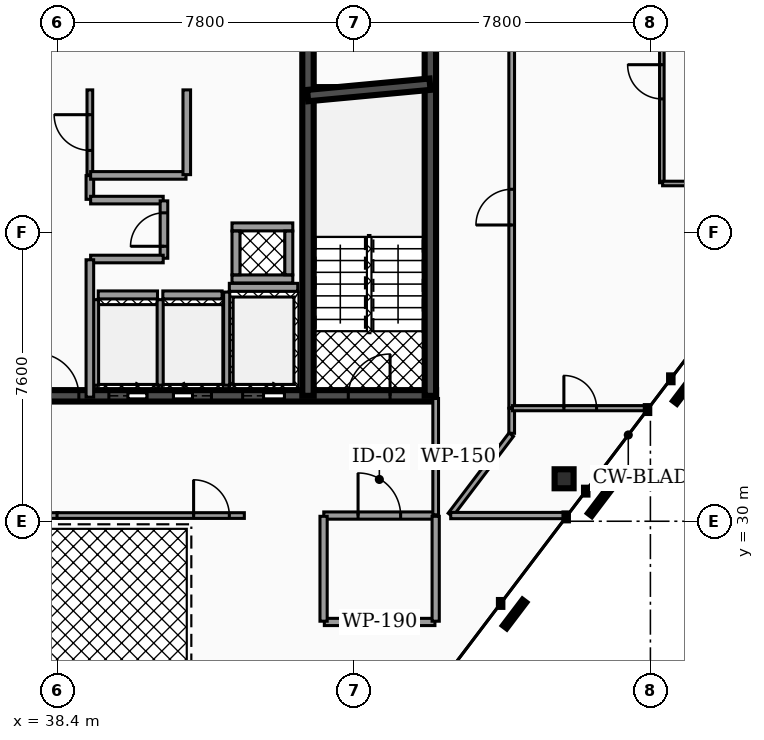
"""IFC4 building model, lengths in metres.
Left out: names, types, materials, properties, quantities, classifications, styles, units other than length and angle.
Written with IfcOpenShell. Run it as: python <this file> out.ifc"""

import sys

from ifc_helpers import new_model, si_unit, direction, frame, frame_2d, origin, origin_2d, place, context, subcontext, project, spatial, rectangle, hollow_rectangle, extrude, element, fill, save


model = new_model("IFC4")
c1 = context("Model", 3, precision=1e-05, world=origin(), true_north=direction((0.0, 1.0)))
c2 = subcontext(c1, "Body", "Model", "MODEL_VIEW")
j1 = project(units=[si_unit("LENGTHUNIT", "METRE"), si_unit("PLANEANGLEUNIT", "RADIAN")], contexts=[c1])
p1 = place(None, origin())
s1 = spatial("IfcSite", under=j1, at=p1, CompositionType="ELEMENT")
p2 = place(p1, origin())
s2 = spatial("IfcBuilding", under=s1, at=p2, CompositionType="ELEMENT")
p3 = place(p2, frame((0.0, 0.0, 265.2)))
s3 = spatial("IfcBuildingStorey", under=s2, at=p3, CompositionType="ELEMENT", Elevation=265.2)
p4 = place(p3, frame((28.5, 33.3, 0.0), z_axis=(0.0, 0.0, 1.0), x_axis=(1.0, 0.0, 0.0)))
e1 = element("IfcWall", 1, at=p4, inside=s3, PredefinedType="SHEAR", context=c2, shape_type="SweptSolid", body=[
    extrude(rectangle(XDim=19.86, YDim=0.3, at=frame_2d((9.93, 0.0))), origin(), (0.0, 0.0, 1.0), 3.18),
])
p5 = place(p4, frame((3.93, 0.0, 0.0)))
e2 = element("IfcOpeningElement", 2, at=p5, cuts=e1, PredefinedType="OPENING", context=c2, shape_type="SweptSolid", body=[
    extrude(rectangle(XDim=1.1, YDim=2.15, at=frame_2d((0.55, 1.075))), frame((0.0, 0.16, 0.0), z_axis=(0.0, -1.0, 0.0), x_axis=(1.0, 0.0, 0.0)), (0.0, 0.0, 1.0), 0.32),
])
p6 = place(p4, frame((14.77, 0.0, 0.0)))
e3 = element("IfcOpeningElement", 3, at=p6, cuts=e1, PredefinedType="OPENING", context=c2, shape_type="SweptSolid", body=[
    extrude(rectangle(XDim=1.1, YDim=2.15, at=frame_2d((0.55, 1.075))), frame((0.0, 0.16, 0.0), z_axis=(0.0, -1.0, 0.0), x_axis=(1.0, 0.0, 0.0)), (0.0, 0.0, 1.0), 0.32),
])
p7 = place(p4, frame((11.25, 0.0, 0.0)))
e4 = element("IfcOpeningElement", 4, at=p7, cuts=e1, PredefinedType="OPENING", context=c2, shape_type="SweptSolid", body=[
    extrude(rectangle(XDim=1.0, YDim=2.1, at=frame_2d((0.5, 1.05))), frame((0.0, 0.16, 0.0), z_axis=(0.0, -1.0, 0.0), x_axis=(1.0, 0.0, 0.0)), (0.0, 0.0, 1.0), 0.32),
])
p8 = place(p4, frame((12.95, 0.0, 0.0)))
e5 = element("IfcOpeningElement", 5, at=p8, cuts=e1, PredefinedType="OPENING", context=c2, shape_type="SweptSolid", body=[
    extrude(rectangle(XDim=1.0, YDim=2.1, at=frame_2d((0.5, 1.05))), frame((0.0, 0.16, 0.0), z_axis=(0.0, -1.0, 0.0), x_axis=(1.0, 0.0, 0.0)), (0.0, 0.0, 1.0), 0.32),
])
p9 = place(p4, frame((5.85, 0.0, 0.0)))
e6 = element("IfcOpeningElement", 6, at=p9, cuts=e1, PredefinedType="OPENING", context=c2, shape_type="SweptSolid", body=[
    extrude(rectangle(XDim=1.0, YDim=2.1, at=frame_2d((0.5, 1.05))), frame((0.0, 0.16, 0.0), z_axis=(0.0, -1.0, 0.0), x_axis=(1.0, 0.0, 0.0)), (0.0, 0.0, 1.0), 0.32),
])
p10 = place(p4, frame((1.21, 0.0, 0.0)))
e7 = element("IfcOpeningElement", 7, at=p10, cuts=e1, PredefinedType="OPENING", context=c2, shape_type="SweptSolid", body=[
    extrude(rectangle(XDim=1.1, YDim=2.2, at=frame_2d((0.55, 1.1))), frame((0.0, 0.16, 0.0), z_axis=(0.0, -1.0, 0.0), x_axis=(1.0, 0.0, 0.0)), (0.0, 0.0, 1.0), 0.32),
])
p11 = place(p4, frame((9.34, 0.0, 0.0)))
e8 = element("IfcOpeningElement", 8, at=p11, cuts=e1, PredefinedType="OPENING", context=c2, shape_type="SweptSolid", body=[
    extrude(rectangle(XDim=1.12, YDim=2.05, at=frame_2d((0.56, 1.025))), frame((0.0, 0.16, 0.0), z_axis=(0.0, -1.0, 0.0), x_axis=(1.0, 0.0, 0.0)), (0.0, 0.0, 1.0), 0.32),
])
p12 = place(p4, frame((17.55, 0.0, 0.0)))
e9 = element("IfcOpeningElement", 9, at=p12, cuts=e1, PredefinedType="OPENING", context=c2, shape_type="SweptSolid", body=[
    extrude(rectangle(XDim=1.1, YDim=2.2, at=frame_2d((0.55, 1.1))), frame((0.0, 0.16, 0.0), z_axis=(0.0, -1.0, 0.0), x_axis=(1.0, 0.0, 0.0)), (0.0, 0.0, 1.0), 0.32),
])
for number, where, z_axis, x_axis in (
    (10, (44.99, 33.3, 0.0), (0.0, 0.0, 1.0), (0.0, 1.0, 0.0)),
    (11, (48.21, 33.3, 0.0), (0.0, 0.0, 1.0), (0.0, 1.0, 0.0)),
):
    element("IfcWall", number, at=place(p3, frame(where, z_axis=z_axis, x_axis=x_axis)), inside=s3, PredefinedType="SHEAR", context=c2, shape_type="SweptSolid", body=[
        extrude(rectangle(XDim=10.1, YDim=0.3, at=frame_2d((5.05, 0.0))), origin(), (0.0, 0.0, 1.0), 3.18),
    ])
p13 = place(p3, frame((44.98, 41.2, 0.0), z_axis=(0.0, 0.0, 1.0), x_axis=(0.995686468965, 0.09278176286, 0.0)))
e12 = element("IfcWall", 12, at=p13, inside=s3, PredefinedType="SHEAR", context=c2, shape_type="SweptSolid", body=[
    extrude(rectangle(XDim=3.234, YDim=0.3, at=frame_2d((1.617, 0.0))), origin(), (0.0, 0.0, 1.0), 3.18),
])
p14 = place(p3, frame((51.729, 31.117, 0.0), z_axis=(-0.140882555326, 0.118923892445, 0.982857677088), x_axis=(-0.645042764465, -0.764146472878, 0.0)))
e13 = element("IfcColumn", 13, at=p14, inside=s3, PredefinedType="COLUMN", context=c2, shape_type="SweptSolid", body=[
    extrude(hollow_rectangle(XDim=0.5, YDim=0.5, WallThickness=0.025, at=origin_2d()), origin(), (0.0, 0.0, 1.0), 3.235),
])
p15 = place(p3, frame((42.92, 36.155, 0.0), z_axis=(0.0, 0.0, 1.0), x_axis=(1.0, 0.0, 0.0)))
e14 = element("IfcWall", 14, at=p15, inside=s3, PredefinedType="SOLIDWALL", context=c2, shape_type="SweptSolid", body=[
    extrude(rectangle(XDim=1.8, YDim=0.21, at=frame_2d((0.9, 0.0))), origin(), (0.0, 0.0, 1.0), 3.18),
])
p16 = place(p3, frame((42.85, 33.58, 0.0), z_axis=(0.0, 0.0, 1.0), x_axis=(0.0, 1.0, 0.0)))
e15 = element("IfcWall", 15, at=p16, inside=s3, PredefinedType="SOLIDWALL", context=c2, shape_type="SweptSolid", body=[
    extrude(rectangle(XDim=2.45, YDim=0.16, at=frame_2d((1.225, 0.0))), origin(), (0.0, 0.0, 1.0), 3.18),
])
p17 = place(p3, frame((39.47, 35.955, 0.0), z_axis=(0.0, 0.0, 1.0), x_axis=(1.0, 0.0, 0.0)))
e16 = element("IfcWall", 16, at=p17, inside=s3, PredefinedType="SOLIDWALL", context=c2, shape_type="SweptSolid", body=[
    extrude(rectangle(XDim=1.56, YDim=0.21, at=frame_2d((0.78, 0.0))), origin(), (0.0, 0.0, 1.0), 3.18),
])
for number, where, z_axis, x_axis in (
    (17, (39.4, 33.58, 0.0), (0.0, 0.0, 1.0), (0.0, 1.0, 0.0)),
    (18, (41.1, 33.58, 0.0), (0.0, 0.0, 1.0), (0.0, 1.0, 0.0)),
):
    element("IfcWall", number, at=place(p3, frame(where, z_axis=z_axis, x_axis=x_axis)), inside=s3, PredefinedType="SOLIDWALL", context=c2, shape_type="SweptSolid", body=[
        extrude(rectangle(XDim=2.25, YDim=0.16, at=frame_2d((1.125, 0.0))), origin(), (0.0, 0.0, 1.0), 3.18),
    ])
p18 = place(p3, frame((41.17, 35.955, 0.0), z_axis=(0.0, 0.0, 1.0), x_axis=(1.0, 0.0, 0.0)))
e19 = element("IfcWall", 19, at=p18, inside=s3, PredefinedType="SOLIDWALL", context=c2, shape_type="SweptSolid", body=[
    extrude(rectangle(XDim=1.56, YDim=0.21, at=frame_2d((0.78, 0.0))), origin(), (0.0, 0.0, 1.0), 3.18),
])
for number, where, z_axis, x_axis in (
    (20, (42.99, 36.375, 0.0), (0.0, 0.0, 1.0), (1.0, 0.0, 0.0)),
    (21, (42.99, 37.745, 0.0), (0.0, 0.0, 1.0), (1.0, 0.0, 0.0)),
):
    element("IfcWall", number, at=place(p3, frame(where, z_axis=z_axis, x_axis=x_axis)), inside=s3, PredefinedType="SOLIDWALL", context=c2, shape_type="SweptSolid", body=[
        extrude(rectangle(XDim=1.6, YDim=0.21, at=frame_2d((0.8, 0.0))), origin(), (0.0, 0.0, 1.0), 3.18),
    ])
for number, where, z_axis, x_axis in (
    (22, (43.095, 36.485, 0.0), (0.0, 0.0, 1.0), (0.0, 1.0, 0.0)),
    (23, (44.485, 36.485, 0.0), (0.0, 0.0, 1.0), (0.0, 1.0, 0.0)),
):
    element("IfcWall", number, at=place(p3, frame(where, z_axis=z_axis, x_axis=x_axis)), inside=s3, PredefinedType="SOLIDWALL", context=c2, shape_type="SweptSolid", body=[
        extrude(rectangle(XDim=1.15, YDim=0.21, at=frame_2d((0.575, 0.0))), origin(), (0.0, 0.0, 1.0), 3.18),
    ])
p19 = place(p3, frame((39.25, 38.47, 0.0), z_axis=(0.0, 0.0, 1.0), x_axis=(0.0, 1.0, 0.0)))
e24 = element("IfcWall", 24, at=p19, inside=s3, PredefinedType="PARTITIONING", context=c2, shape_type="SweptSolid", body=[
    extrude(rectangle(XDim=0.625, YDim=0.2, at=frame_2d((0.312, 0.0))), origin(), (0.0, 0.0, 1.0), 2.235),
])
p20 = place(p3, frame((39.27, 38.45, 0.0), z_axis=(0.0, 0.0, 1.0), x_axis=(1.0, 0.0, 0.0)))
e25 = element("IfcWall", 25, at=p20, inside=s3, PredefinedType="PARTITIONING", context=c2, shape_type="SweptSolid", body=[
    extrude(rectangle(XDim=1.91, YDim=0.2, at=frame_2d((0.955, 0.0))), origin(), (0.0, 0.0, 1.0), 2.235),
])
p21 = place(p3, frame((41.2, 36.92, 0.0), z_axis=(0.0, 0.0, 1.0), x_axis=(0.0, 1.0, 0.0)))
e26 = element("IfcWall", 26, at=p21, inside=s3, PredefinedType="PARTITIONING", context=c2, shape_type="SweptSolid", body=[
    extrude(rectangle(XDim=1.51, YDim=0.2, at=frame_2d((0.755, 0.0))), origin(), (0.0, 0.0, 1.0), 2.235),
])
p22 = place(p21, frame((0.315, 0.0, 0.0)))
e27 = element("IfcOpeningElement", 27, at=p22, cuts=e26, PredefinedType="OPENING", context=c2, shape_type="SweptSolid", body=[
    extrude(rectangle(XDim=0.88, YDim=2.05, at=frame_2d((0.44, 1.025))), frame((0.0, 0.11, 0.0), z_axis=(0.0, -1.0, 0.0), x_axis=(1.0, 0.0, 0.0)), (0.0, 0.0, 1.0), 0.22),
])
p23 = place(p3, frame((39.27, 36.9, 0.0), z_axis=(0.0, 0.0, 1.0), x_axis=(1.0, 0.0, 0.0)))
e28 = element("IfcWall", 28, at=p23, inside=s3, PredefinedType="PARTITIONING", context=c2, shape_type="SweptSolid", body=[
    extrude(rectangle(XDim=1.91, YDim=0.2, at=frame_2d((0.955, 0.0))), origin(), (0.0, 0.0, 1.0), 2.235),
])
p24 = place(p3, frame((39.25, 33.265, 0.0), z_axis=(0.0, 0.0, 1.0), x_axis=(0.0, 1.0, 0.0)))
e29 = element("IfcWall", 29, at=p24, inside=s3, PredefinedType="PARTITIONING", context=c2, shape_type="SweptSolid", body=[
    extrude(rectangle(XDim=3.615, YDim=0.2, at=frame_2d((1.808, 0.0))), origin(), (0.0, 0.0, 1.0), 2.235),
])
p25 = place(p3, frame((39.25, 39.105, 0.0), z_axis=(0.0, 0.0, 1.0), x_axis=(0.0, 1.0, 0.0)))
e30 = element("IfcWall", 30, at=p25, inside=s3, PredefinedType="PARTITIONING", context=c2, shape_type="SweptSolid", body=[
    extrude(rectangle(XDim=2.245, YDim=0.15, at=frame_2d((1.123, 0.0))), origin(), (0.0, 0.0, 1.0), 2.235),
])
p26 = place(p25, frame((0.653, 0.0, 0.0)))
e31 = element("IfcOpeningElement", 31, at=p26, cuts=e30, PredefinedType="OPENING", context=c2, shape_type="SweptSolid", body=[
    extrude(rectangle(XDim=0.94, YDim=2.05, at=frame_2d((0.47, 1.025))), frame((0.0, 0.085, 0.0), z_axis=(0.0, -1.0, 0.0), x_axis=(1.0, 0.0, 0.0)), (0.0, 0.0, 1.0), 0.17),
])
p27 = place(p3, frame((39.27, 39.1, 0.0), z_axis=(0.0, 0.0, 1.0), x_axis=(1.0, 0.0, 0.0)))
e32 = element("IfcWall", 32, at=p27, inside=s3, PredefinedType="PARTITIONING", context=c2, shape_type="SweptSolid", body=[
    extrude(rectangle(XDim=2.51, YDim=0.2, at=frame_2d((1.255, 0.0))), origin(), (0.0, 0.0, 1.0), 2.235),
])
p28 = place(p3, frame((41.8, 39.12, 0.0), z_axis=(0.0, 0.0, 1.0), x_axis=(0.0, 1.0, 0.0)))
e33 = element("IfcWall", 33, at=p28, inside=s3, PredefinedType="PARTITIONING", context=c2, shape_type="SweptSolid", body=[
    extrude(rectangle(XDim=2.23, YDim=0.2, at=frame_2d((1.115, 0.0))), origin(), (0.0, 0.0, 1.0), 2.235),
])
p29 = place(p3, frame((45.405, 30.15, 0.0), z_axis=(0.0, 0.0, 1.0), x_axis=(1.0, 0.0, 0.0)))
e34 = element("IfcWall", 34, at=p29, inside=s3, PredefinedType="PARTITIONING", context=c2, shape_type="SweptSolid", body=[
    extrude(rectangle(XDim=2.925, YDim=0.19, at=frame_2d((1.462, 0.0))), origin(), (0.0, 0.0, 1.0), 2.235),
])
p30 = place(p29, frame((0.903, 0.0, 0.0)))
e35 = element("IfcOpeningElement", 35, at=p30, cuts=e34, PredefinedType="OPENING", context=c2, shape_type="SweptSolid", body=[
    extrude(rectangle(XDim=1.12, YDim=2.05, at=frame_2d((0.56, 1.025))), frame((0.0, 0.105, 0.0), z_axis=(0.0, -1.0, 0.0), x_axis=(1.0, 0.0, 0.0)), (0.0, 0.0, 1.0), 0.21),
])
p31 = place(p3, frame((48.35, 30.17, 0.0), z_axis=(0.0, 0.0, 1.0), x_axis=(0.0, 1.0, 0.0)))
e36 = element("IfcWall", 36, at=p31, inside=s3, PredefinedType="PARTITIONING", context=c2, shape_type="SweptSolid", body=[
    extrude(rectangle(XDim=3.06, YDim=0.15, at=frame_2d((1.53, 0.0))), origin(), (0.0, 0.0, 1.0), 2.235),
])
p32 = place(p3, frame((33.485, 30.15, 0.0), z_axis=(0.0, 0.0, 1.0), x_axis=(1.0, 0.0, 0.0)))
e37 = element("IfcWall", 37, at=p32, inside=s3, PredefinedType="PARTITIONING", context=c2, shape_type="SweptSolid", body=[
    extrude(rectangle(XDim=4.93, YDim=0.15, at=frame_2d((2.465, 0.0))), origin(), (0.0, 0.0, 1.0), 2.235),
])
p33 = place(p32, frame((0.395, 0.0, 0.0)))
e38 = element("IfcOpeningElement", 38, at=p33, cuts=e37, PredefinedType="OPENING", context=c2, shape_type="SweptSolid", body=[
    extrude(rectangle(XDim=0.94, YDim=2.05, at=frame_2d((0.47, 1.025))), frame((0.0, 0.085, 0.0), z_axis=(0.0, -1.0, 0.0), x_axis=(1.0, 0.0, 0.0)), (0.0, 0.0, 1.0), 0.17),
])
p34 = place(p3, frame((38.385, 30.15, 0.0), z_axis=(0.0, 0.0, 1.0), x_axis=(1.0, 0.0, 0.0)))
e39 = element("IfcWall", 39, at=p34, inside=s3, PredefinedType="PARTITIONING", context=c2, shape_type="SweptSolid", body=[
    extrude(rectangle(XDim=4.93, YDim=0.15, at=frame_2d((2.465, 0.0))), origin(), (0.0, 0.0, 1.0), 2.235),
])
p35 = place(p34, frame((3.595, 0.0, 0.0)))
e40 = element("IfcOpeningElement", 40, at=p35, cuts=e39, PredefinedType="OPENING", context=c2, shape_type="SweptSolid", body=[
    extrude(rectangle(XDim=0.94, YDim=2.05, at=frame_2d((0.47, 1.025))), frame((0.0, 0.085, 0.0), z_axis=(0.0, -1.0, 0.0), x_axis=(1.0, 0.0, 0.0)), (0.0, 0.0, 1.0), 0.17),
])
p36 = place(p3, frame((45.42, 27.35, 0.0), z_axis=(0.0, 0.0, 1.0), x_axis=(1.0, 0.0, 0.0)))
e41 = element("IfcWall", 41, at=p36, inside=s3, PredefinedType="PARTITIONING", context=c2, shape_type="SweptSolid", body=[
    extrude(rectangle(XDim=2.91, YDim=0.19, at=frame_2d((1.455, 0.0))), origin(), (0.0, 0.0, 1.0), 2.235),
])
for number, where, z_axis, x_axis in (
    (42, (45.4, 27.37, 0.0), (0.0, 0.0, 1.0), (0.0, 1.0, 0.0)),
    (43, (48.35, 27.37, 0.0), (0.0, 0.0, 1.0), (0.0, 1.0, 0.0)),
):
    element("IfcWall", number, at=place(p3, frame(where, z_axis=z_axis, x_axis=x_axis)), inside=s3, PredefinedType="PARTITIONING", context=c2, shape_type="SweptSolid", body=[
        extrude(rectangle(XDim=2.76, YDim=0.19, at=frame_2d((1.38, 0.0))), origin(), (0.0, 0.0, 1.0), 2.235),
    ])
p37 = place(p3, frame((50.35, 32.98, 0.0), z_axis=(0.0, 0.0, 1.0), x_axis=(0.0, 1.0, 0.0)))
e44 = element("IfcWall", 44, at=p37, inside=s3, PredefinedType="PARTITIONING", context=c2, shape_type="SweptSolid", body=[
    extrude(rectangle(XDim=10.57, YDim=0.15, at=frame_2d((5.285, 0.0))), origin(), (0.0, 0.0, 1.0), 2.235),
])
p38 = place(p37, frame((4.815, 0.0, 0.0)))
e45 = element("IfcOpeningElement", 45, at=p38, cuts=e44, PredefinedType="OPENING", context=c2, shape_type="SweptSolid", body=[
    extrude(rectangle(XDim=0.94, YDim=2.05, at=frame_2d((0.47, 1.025))), frame((0.0, 0.085, 0.0), z_axis=(0.0, -1.0, 0.0), x_axis=(1.0, 0.0, 0.0)), (0.0, 0.0, 1.0), 0.17),
])
p39 = place(p3, frame((50.35, 32.314, 0.0), z_axis=(0.0, 0.0, 1.0), x_axis=(0.0, 1.0, 0.0)))
e46 = element("IfcWall", 46, at=p39, inside=s3, PredefinedType="PARTITIONING", context=c2, shape_type="SweptSolid", body=[
    extrude(rectangle(XDim=0.656, YDim=0.15, at=frame_2d((0.328, 0.0))), origin(), (0.0, 0.0, 1.0), 2.235),
])
p40 = place(p3, frame((48.738, 30.166, 0.0), z_axis=(0.0, 0.0, 1.0), x_axis=(0.603839951985, 0.797105584215, 0.0)))
e47 = element("IfcWall", 47, at=p40, inside=s3, PredefinedType="PARTITIONING", context=c2, shape_type="SweptSolid", body=[
    extrude(rectangle(XDim=2.65, YDim=0.15, at=frame_2d((1.325, 0.0))), origin(), (0.0, 0.0, 1.0), 2.235),
])
p41 = place(p3, frame((48.745, 30.15, 0.0), z_axis=(0.0, 0.0, 1.0), x_axis=(1.0, 0.0, 0.0)))
e48 = element("IfcWall", 48, at=p41, inside=s3, PredefinedType="PARTITIONING", context=c2, shape_type="SweptSolid", body=[
    extrude(rectangle(XDim=3.051, YDim=0.165, at=frame_2d((1.526, 0.0))), origin(), (0.0, 0.0, 1.0), 2.235),
])
p42 = place(p3, frame((50.37, 32.975, 0.0), z_axis=(0.0, 0.0, 1.0), x_axis=(1.0, 0.0, 0.0)))
e49 = element("IfcWall", 49, at=p42, inside=s3, PredefinedType="PARTITIONING", context=c2, shape_type="SweptSolid", body=[
    extrude(rectangle(XDim=3.567, YDim=0.135, at=frame_2d((1.783, 0.0))), origin(), (0.0, 0.0, 1.0), 2.235),
])
p43 = place(p42, frame((1.354, 0.0, 0.0)))
e50 = element("IfcOpeningElement", 50, at=p43, cuts=e49, PredefinedType="OPENING", context=c2, shape_type="SweptSolid", body=[
    extrude(rectangle(XDim=0.86, YDim=2.05, at=frame_2d((0.43, 1.025))), frame((0.0, 0.077, 0.0), z_axis=(0.0, -1.0, 0.0), x_axis=(1.0, 0.0, 0.0)), (0.0, 0.0, 1.0), 0.155),
])
p44 = place(p3, frame((54.301, 38.907, 0.0), z_axis=(0.0, 0.0, 1.0), x_axis=(0.0, 1.0, 0.0)))
e51 = element("IfcWall", 51, at=p44, inside=s3, PredefinedType="PARTITIONING", context=c2, shape_type="SweptSolid", body=[
    extrude(rectangle(XDim=5.312, YDim=0.12, at=frame_2d((2.656, 0.0))), origin(), (0.0, 0.0, 1.0), 2.235),
])
p45 = place(p44, frame((2.206, 0.0, 0.0)))
e52 = element("IfcOpeningElement", 52, at=p45, cuts=e51, PredefinedType="OPENING", context=c2, shape_type="SweptSolid", body=[
    extrude(rectangle(XDim=0.9, YDim=2.05, at=frame_2d((0.45, 1.025))), frame((0.0, 0.07, 0.0), z_axis=(0.0, -1.0, 0.0), x_axis=(1.0, 0.0, 0.0)), (0.0, 0.0, 1.0), 0.14),
])
p46 = place(p3, frame((54.321, 38.887, 0.0), z_axis=(0.0, 0.0, 1.0), x_axis=(1.0, 0.0, 0.0)))
e53 = element("IfcWall", 53, at=p46, inside=s3, PredefinedType="PARTITIONING", context=c2, shape_type="SweptSolid", body=[
    extrude(rectangle(XDim=4.095, YDim=0.12, at=frame_2d((2.047, 0.0))), origin(), (0.0, 0.0, 1.0), 2.235),
])
p47 = place(p6, origin())
e54 = element("IfcDoor", 54, at=p47, inside=s3, OperationType="SLIDING_TO_RIGHT", PredefinedType="DOOR", context=c2, shape_type="SweptSolid", body=[
    extrude(rectangle(XDim=1.1, YDim=2.15, at=frame_2d((0.55, 1.075))), frame((0.0, 0.025, 0.0), z_axis=(0.0, -1.0, 0.0), x_axis=(1.0, 0.0, 0.0)), (0.0, 0.0, 1.0), 0.05),
])
fill(e3, e54)
p48 = place(p7, origin())
e55 = element("IfcDoor", 55, at=p48, inside=s3, OperationType="SLIDING_TO_RIGHT", PredefinedType="DOOR", context=c2, shape_type="SweptSolid", body=[
    extrude(rectangle(XDim=1.0, YDim=2.1, at=frame_2d((0.5, 1.05))), frame((0.0, 0.025, 0.0), z_axis=(0.0, -1.0, 0.0), x_axis=(1.0, 0.0, 0.0)), (0.0, 0.0, 1.0), 0.05),
])
fill(e4, e55)
p49 = place(p8, origin())
e56 = element("IfcDoor", 56, at=p49, inside=s3, OperationType="SLIDING_TO_LEFT", PredefinedType="DOOR", context=c2, shape_type="SweptSolid", body=[
    extrude(rectangle(XDim=1.0, YDim=2.1, at=frame_2d((0.5, 1.05))), frame((0.0, 0.025, 0.0), z_axis=(0.0, -1.0, 0.0), x_axis=(1.0, 0.0, 0.0)), (0.0, 0.0, 1.0), 0.05),
])
fill(e5, e56)
p50 = place(p11, origin())
e57 = element("IfcDoor", 57, at=p50, inside=s3, OperationType="SINGLE_SWING_LEFT", PredefinedType="DOOR", context=c2, shape_type="SweptSolid", body=[
    extrude(rectangle(XDim=1.12, YDim=2.05, at=frame_2d((0.56, 1.025))), frame((0.0, 0.025, 0.0), z_axis=(0.0, -1.0, 0.0), x_axis=(1.0, 0.0, 0.0)), (0.0, 0.0, 1.0), 0.05),
])
fill(e8, e57)
p51 = place(p12, origin())
e58 = element("IfcDoor", 58, at=p51, inside=s3, OperationType="SINGLE_SWING_RIGHT", PredefinedType="DOOR", context=c2, shape_type="SweptSolid", body=[
    extrude(rectangle(XDim=1.1, YDim=2.2, at=frame_2d((0.55, 1.1))), frame((0.0, 0.025, 0.0), z_axis=(0.0, -1.0, 0.0), x_axis=(1.0, 0.0, 0.0)), (0.0, 0.0, 1.0), 0.05),
])
fill(e9, e58)
p52 = place(p22, origin())
e59 = element("IfcDoor", 59, at=p52, inside=s3, OperationType="SINGLE_SWING_LEFT", PredefinedType="DOOR", context=c2, shape_type="SweptSolid", body=[
    extrude(rectangle(XDim=0.88, YDim=2.05, at=frame_2d((0.44, 1.025))), frame((0.0, 0.025, 0.0), z_axis=(0.0, -1.0, 0.0), x_axis=(1.0, 0.0, 0.0)), (0.0, 0.0, 1.0), 0.05),
])
fill(e27, e59)
p53 = place(p26, origin())
e60 = element("IfcDoor", 60, at=p53, inside=s3, OperationType="SINGLE_SWING_RIGHT", PredefinedType="DOOR", context=c2, shape_type="SweptSolid", body=[
    extrude(rectangle(XDim=0.94, YDim=2.05, at=frame_2d((0.47, 1.025))), frame((0.0, 0.025, 0.0), z_axis=(0.0, -1.0, 0.0), x_axis=(1.0, 0.0, 0.0)), (0.0, 0.0, 1.0), 0.05),
])
fill(e31, e60)
p54 = place(p30, origin())
e61 = element("IfcDoor", 61, at=p54, inside=s3, OperationType="SINGLE_SWING_LEFT", PredefinedType="DOOR", context=c2, shape_type="SweptSolid", body=[
    extrude(rectangle(XDim=1.12, YDim=2.05, at=frame_2d((0.56, 1.025))), frame((0.0, 0.025, 0.0), z_axis=(0.0, -1.0, 0.0), x_axis=(1.0, 0.0, 0.0)), (0.0, 0.0, 1.0), 0.05),
])
fill(e35, e61)
p55 = place(p35, origin())
e62 = element("IfcDoor", 62, at=p55, inside=s3, OperationType="SINGLE_SWING_LEFT", PredefinedType="DOOR", context=c2, shape_type="SweptSolid", body=[
    extrude(rectangle(XDim=0.94, YDim=2.05, at=frame_2d((0.47, 1.025))), frame((0.0, 0.025, 0.0), z_axis=(0.0, -1.0, 0.0), x_axis=(1.0, 0.0, 0.0)), (0.0, 0.0, 1.0), 0.05),
])
fill(e40, e62)
p56 = place(p38, origin())
e63 = element("IfcDoor", 63, at=p56, inside=s3, OperationType="SINGLE_SWING_LEFT", PredefinedType="DOOR", context=c2, shape_type="SweptSolid", body=[
    extrude(rectangle(XDim=0.94, YDim=2.05, at=frame_2d((0.47, 1.025))), frame((0.0, 0.025, 0.0), z_axis=(0.0, -1.0, 0.0), x_axis=(1.0, 0.0, 0.0)), (0.0, 0.0, 1.0), 0.05),
])
fill(e45, e63)
p57 = place(p43, origin())
e64 = element("IfcDoor", 64, at=p57, inside=s3, OperationType="SINGLE_SWING_LEFT", PredefinedType="DOOR", context=c2, shape_type="SweptSolid", body=[
    extrude(rectangle(XDim=0.86, YDim=2.05, at=frame_2d((0.43, 1.025))), frame((0.0, 0.025, 0.0), z_axis=(0.0, -1.0, 0.0), x_axis=(1.0, 0.0, 0.0)), (0.0, 0.0, 1.0), 0.05),
])
fill(e50, e64)
p58 = place(p45, origin())
e65 = element("IfcDoor", 65, at=p58, inside=s3, OperationType="SINGLE_SWING_RIGHT", PredefinedType="DOOR", context=c2, shape_type="SweptSolid", body=[
    extrude(rectangle(XDim=0.9, YDim=2.05, at=frame_2d((0.45, 1.025))), frame((0.0, 0.025, 0.0), z_axis=(0.0, -1.0, 0.0), x_axis=(1.0, 0.0, 0.0)), (0.0, 0.0, 1.0), 0.05),
])
fill(e52, e65)
save(model, sys.argv[1])
